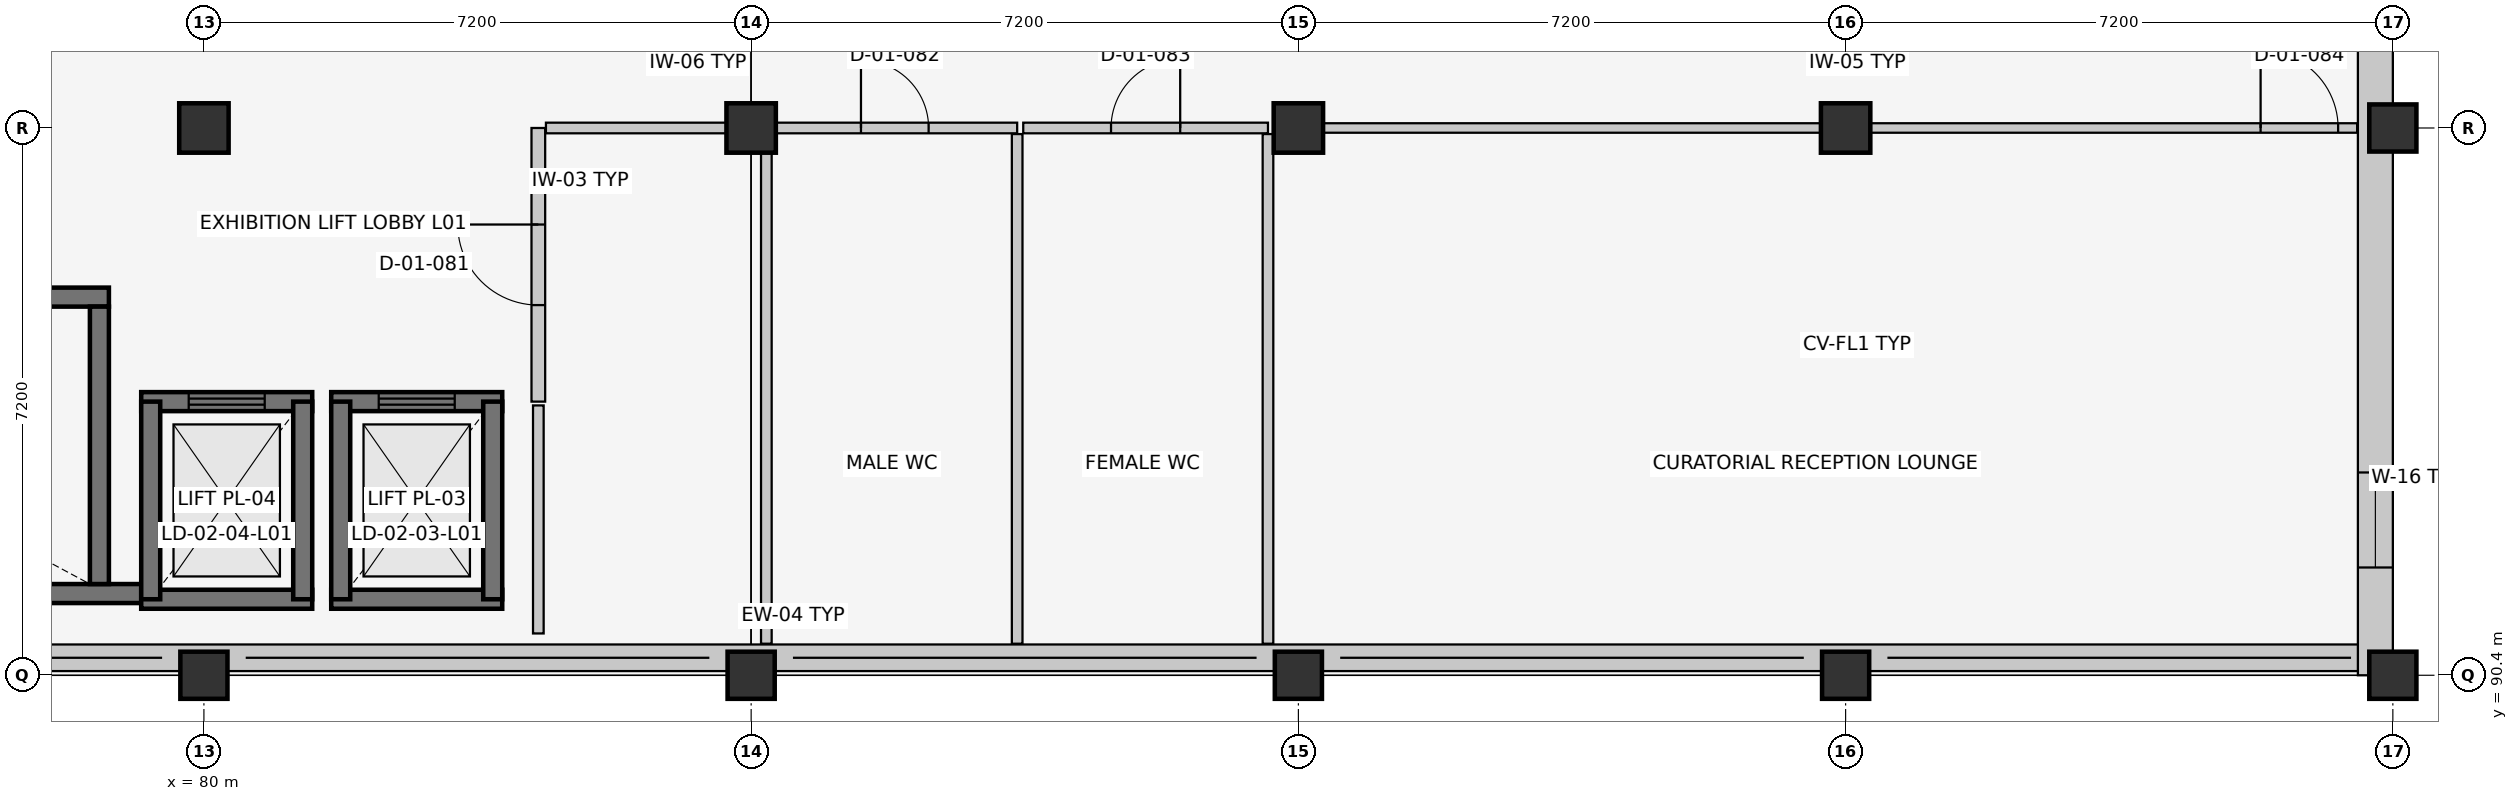
"""IFC4 building model, lengths in metres.
Left out: names, types, materials, properties, quantities, classifications, styles, units other than length and angle.
Written with IfcOpenShell. Run it as: python <this file> out.ifc"""

import sys

from ifc_helpers import new_model, si_unit, direction, frame, frame_2d, origin, origin_2d, place, context, subcontext, project, spatial, rectangle, extrude, element, fill, save


model = new_model("IFC4")
c1 = context("Model", 3, precision=1e-05, world=origin(), true_north=direction((0.0, 1.0)))
c2 = subcontext(c1, "Body", "Model", "MODEL_VIEW")
j1 = project(units=[si_unit("LENGTHUNIT", "METRE"), si_unit("PLANEANGLEUNIT", "RADIAN")], contexts=[c1])
p1 = place(None, origin())
s1 = spatial("IfcSite", under=j1, at=p1, CompositionType="ELEMENT")
p2 = place(p1, origin())
s2 = spatial("IfcBuilding", under=s1, at=p2, CompositionType="ELEMENT")
p3 = place(p2, frame((0.0, 0.0, 5.4)))
s3 = spatial("IfcBuildingStorey", under=s2, at=p3, CompositionType="ELEMENT", Elevation=5.4)
p4 = place(p3, frame((80.0, 90.4, 0.0), z_axis=(0.0, 0.0, 1.0), x_axis=(1.0, 0.0, 0.0)))
e1 = element("IfcColumn", 1, at=p4, inside=s3, PredefinedType="COLUMN", context=c2, shape_type="SweptSolid", body=[
    extrude(rectangle(XDim=0.62, YDim=0.62, at=origin_2d()), origin(), (0.0, 0.0, 1.0), 4.2),
])
p5 = place(p3, frame((80.0, 97.6, 0.0), z_axis=(0.0, 0.0, 1.0), x_axis=(1.0, 0.0, 0.0)))
e2 = element("IfcColumn", 2, at=p5, inside=s3, PredefinedType="COLUMN", context=c2, shape_type="SweptSolid", body=[
    extrude(rectangle(XDim=0.65, YDim=0.65, at=origin_2d()), origin(), (0.0, 0.0, 1.0), 4.2),
])
p6 = place(p3, frame((87.2, 90.4, 0.0), z_axis=(0.0, 0.0, 1.0), x_axis=(1.0, 0.0, 0.0)))
e3 = element("IfcColumn", 3, at=p6, inside=s3, PredefinedType="COLUMN", context=c2, shape_type="SweptSolid", body=[
    extrude(rectangle(XDim=0.62, YDim=0.62, at=origin_2d()), origin(), (0.0, 0.0, 1.0), 4.2),
])
p7 = place(p3, frame((87.2, 97.6, 0.0), z_axis=(0.0, 0.0, 1.0), x_axis=(1.0, 0.0, 0.0)))
e4 = element("IfcColumn", 4, at=p7, inside=s3, PredefinedType="COLUMN", context=c2, shape_type="SweptSolid", body=[
    extrude(rectangle(XDim=0.65, YDim=0.65, at=origin_2d()), origin(), (0.0, 0.0, 1.0), 4.2),
])
p8 = place(p3, frame((94.4, 90.4, 0.0), z_axis=(0.0, 0.0, 1.0), x_axis=(1.0, 0.0, 0.0)))
e5 = element("IfcColumn", 5, at=p8, inside=s3, PredefinedType="COLUMN", context=c2, shape_type="SweptSolid", body=[
    extrude(rectangle(XDim=0.62, YDim=0.62, at=origin_2d()), origin(), (0.0, 0.0, 1.0), 4.2),
])
p9 = place(p3, frame((94.4, 97.6, 0.0), z_axis=(0.0, 0.0, 1.0), x_axis=(1.0, 0.0, 0.0)))
e6 = element("IfcColumn", 6, at=p9, inside=s3, PredefinedType="COLUMN", context=c2, shape_type="SweptSolid", body=[
    extrude(rectangle(XDim=0.65, YDim=0.65, at=origin_2d()), origin(), (0.0, 0.0, 1.0), 4.2),
])
p10 = place(p3, frame((101.6, 90.4, 0.0), z_axis=(0.0, 0.0, 1.0), x_axis=(1.0, 0.0, 0.0)))
e7 = element("IfcColumn", 7, at=p10, inside=s3, PredefinedType="COLUMN", context=c2, shape_type="SweptSolid", body=[
    extrude(rectangle(XDim=0.62, YDim=0.62, at=origin_2d()), origin(), (0.0, 0.0, 1.0), 4.2),
])
p11 = place(p3, frame((101.6, 97.6, 0.0), z_axis=(0.0, 0.0, 1.0), x_axis=(1.0, 0.0, 0.0)))
e8 = element("IfcColumn", 8, at=p11, inside=s3, PredefinedType="COLUMN", context=c2, shape_type="SweptSolid", body=[
    extrude(rectangle(XDim=0.65, YDim=0.65, at=origin_2d()), origin(), (0.0, 0.0, 1.0), 4.2),
])
for number, where, z_axis, x_axis in (
    (9, (108.8, 90.4, 0.0), (0.0, 0.0, 1.0), (1.0, 0.0, 0.0)),
    (10, (108.8, 97.6, 0.0), (0.0, 0.0, 1.0), (1.0, 0.0, 0.0)),
):
    element("IfcColumn", number, at=place(p3, frame(where, z_axis=z_axis, x_axis=x_axis)), inside=s3, PredefinedType="COLUMN", context=c2, shape_type="SweptSolid", body=[
        extrude(rectangle(XDim=0.62, YDim=0.62, at=origin_2d()), origin(), (0.0, 0.0, 1.0), 4.2),
    ])
p12 = place(p3, frame((108.8, 90.63, 0.0), z_axis=(0.0, 0.0, 1.0), x_axis=(-1.0, 0.0, 0.0)))
e11 = element("IfcWall", 11, at=p12, inside=s3, PredefinedType="SOLIDWALL", context=c2, shape_type="SweptSolid", body=[
    extrude(rectangle(XDim=43.2, YDim=0.35, at=frame_2d((21.6, 0.0))), origin(), (0.0, 0.0, 1.0), 0.85),
])
p13 = place(p3, frame((108.57, 119.0, 0.0), z_axis=(0.0, 0.0, 1.0), x_axis=(0.0, -1.0, 0.0)))
e12 = element("IfcWall", 12, at=p13, inside=s3, PredefinedType="SOLIDWALL", context=c2, shape_type="SweptSolid", body=[
    extrude(rectangle(XDim=28.6, YDim=0.46, at=frame_2d((14.3, 0.0))), origin(), (0.0, 0.0, 1.0), 3.175),
])
p14 = place(p13, frame((1.418, 0.0, 0.9)))
e13 = element("IfcOpeningElement", 13, at=p14, cuts=e12, PredefinedType="OPENING", context=c2, shape_type="SweptSolid", body=[
    extrude(rectangle(XDim=1.25, YDim=1.45, at=frame_2d((0.625, 0.725))), frame((0.0, 0.242, 0.0), z_axis=(0.0, -1.0, 0.0), x_axis=(1.0, 0.0, 0.0)), (0.0, 0.0, 1.0), 0.484),
])
p15 = place(p13, frame((9.489, 0.0, 0.9)))
e14 = element("IfcOpeningElement", 14, at=p15, cuts=e12, PredefinedType="OPENING", context=c2, shape_type="SweptSolid", body=[
    extrude(rectangle(XDim=1.45, YDim=1.45, at=frame_2d((0.725, 0.725))), frame((0.0, 0.242, 0.0), z_axis=(0.0, -1.0, 0.0), x_axis=(1.0, 0.0, 0.0)), (0.0, 0.0, 1.0), 0.484),
])
p16 = place(p13, frame((25.932, 0.0, 0.9)))
e15 = element("IfcOpeningElement", 15, at=p16, cuts=e12, PredefinedType="OPENING", context=c2, shape_type="SweptSolid", body=[
    extrude(rectangle(XDim=1.25, YDim=1.6, at=frame_2d((0.625, 0.8))), frame((0.0, 0.242, 0.0), z_axis=(0.0, -1.0, 0.0), x_axis=(1.0, 0.0, 0.0)), (0.0, 0.0, 1.0), 0.484),
])
p17 = place(p3, frame((69.75, 91.475, 0.0), z_axis=(0.0, 0.0, 1.0), x_axis=(1.0, 0.0, 0.0)))
e16 = element("IfcWall", 16, at=p17, inside=s3, PredefinedType="SHEAR", context=c2, shape_type="SweptSolid", body=[
    extrude(rectangle(XDim=9.57, YDim=0.25, at=frame_2d((4.785, 0.0))), origin(), (0.0, 0.0, 1.0), 3.92),
])
p18 = place(p3, frame((78.75, 95.375, 0.0), z_axis=(0.0, 0.0, 1.0), x_axis=(-1.0, 0.0, 0.0)))
e17 = element("IfcWall", 17, at=p18, inside=s3, PredefinedType="SHEAR", context=c2, shape_type="SweptSolid", body=[
    extrude(rectangle(XDim=9.0, YDim=0.25, at=frame_2d((4.5, 0.0))), origin(), (0.0, 0.0, 1.0), 3.92),
])
p19 = place(p3, frame((78.625, 91.6, 0.0), z_axis=(0.0, 0.0, 1.0), x_axis=(0.0, 1.0, 0.0)))
e18 = element("IfcWall", 18, at=p19, inside=s3, PredefinedType="SHEAR", context=c2, shape_type="SweptSolid", body=[
    extrude(rectangle(XDim=3.65, YDim=0.25, at=frame_2d((1.825, 0.0))), origin(), (0.0, 0.0, 1.0), 3.92),
])
p20 = place(p3, frame((79.175, 91.4, 0.0), z_axis=(0.0, 0.0, 1.0), x_axis=(1.0, 0.0, 0.0)))
e19 = element("IfcWall", 19, at=p20, inside=s3, PredefinedType="SHEAR", context=c2, shape_type="SweptSolid", body=[
    extrude(rectangle(XDim=2.25, YDim=0.25, at=frame_2d((1.125, 0.0))), origin(), (0.0, 0.0, 1.0), 3.92),
])
p21 = place(p3, frame((81.425, 94.0, 0.0), z_axis=(0.0, 0.0, 1.0), x_axis=(-1.0, 0.0, 0.0)))
e20 = element("IfcWall", 20, at=p21, inside=s3, PredefinedType="SHEAR", context=c2, shape_type="SweptSolid", body=[
    extrude(rectangle(XDim=2.25, YDim=0.25, at=frame_2d((1.125, 0.0))), origin(), (0.0, 0.0, 1.0), 3.92),
])
p22 = place(p21, frame((0.625, 0.0, 0.0)))
e21 = element("IfcOpeningElement", 21, at=p22, cuts=e20, PredefinedType="OPENING", context=c2, shape_type="SweptSolid", body=[
    extrude(rectangle(XDim=1.0, YDim=2.15, at=frame_2d((0.5, 1.075))), frame((0.0, 0.137, 0.0), z_axis=(0.0, -1.0, 0.0), x_axis=(1.0, 0.0, 0.0)), (0.0, 0.0, 1.0), 0.274),
])
for number, where, z_axis, x_axis in (
    (22, (79.3, 94.0, 0.0), (0.0, 0.0, 1.0), (0.0, -1.0, 0.0)),
    (23, (81.3, 91.4, 0.0), (0.0, 0.0, 1.0), (0.0, 1.0, 0.0)),
):
    element("IfcWall", number, at=place(p3, frame(where, z_axis=z_axis, x_axis=x_axis)), inside=s3, PredefinedType="SHEAR", context=c2, shape_type="SweptSolid", body=[
        extrude(rectangle(XDim=2.6, YDim=0.25, at=frame_2d((1.3, 0.0))), origin(), (0.0, 0.0, 1.0), 3.92),
    ])
p23 = place(p3, frame((81.675, 91.4, 0.0), z_axis=(0.0, 0.0, 1.0), x_axis=(1.0, 0.0, 0.0)))
e24 = element("IfcWall", 24, at=p23, inside=s3, PredefinedType="SHEAR", context=c2, shape_type="SweptSolid", body=[
    extrude(rectangle(XDim=2.25, YDim=0.25, at=frame_2d((1.125, 0.0))), origin(), (0.0, 0.0, 1.0), 3.92),
])
p24 = place(p3, frame((83.925, 94.0, 0.0), z_axis=(0.0, 0.0, 1.0), x_axis=(-1.0, 0.0, 0.0)))
e25 = element("IfcWall", 25, at=p24, inside=s3, PredefinedType="SHEAR", context=c2, shape_type="SweptSolid", body=[
    extrude(rectangle(XDim=2.25, YDim=0.25, at=frame_2d((1.125, 0.0))), origin(), (0.0, 0.0, 1.0), 3.92),
])
p25 = place(p24, frame((0.625, 0.0, 0.0)))
e26 = element("IfcOpeningElement", 26, at=p25, cuts=e25, PredefinedType="OPENING", context=c2, shape_type="SweptSolid", body=[
    extrude(rectangle(XDim=1.0, YDim=2.15, at=frame_2d((0.5, 1.075))), frame((0.0, 0.137, 0.0), z_axis=(0.0, -1.0, 0.0), x_axis=(1.0, 0.0, 0.0)), (0.0, 0.0, 1.0), 0.274),
])
for number, where, z_axis, x_axis in (
    (27, (81.8, 94.0, 0.0), (0.0, 0.0, 1.0), (0.0, -1.0, 0.0)),
    (28, (83.8, 91.4, 0.0), (0.0, 0.0, 1.0), (0.0, 1.0, 0.0)),
):
    element("IfcWall", number, at=place(p3, frame(where, z_axis=z_axis, x_axis=x_axis)), inside=s3, PredefinedType="SHEAR", context=c2, shape_type="SweptSolid", body=[
        extrude(rectangle(XDim=2.6, YDim=0.25, at=frame_2d((1.3, 0.0))), origin(), (0.0, 0.0, 1.0), 3.92),
    ])
p26 = place(p3, frame((84.4, 94.0, 0.0), z_axis=(0.0, 0.0, 1.0), x_axis=(0.0, 1.0, 0.0)))
e29 = element("IfcWall", 29, at=p26, inside=s3, PredefinedType="PARTITIONING", context=c2, shape_type="SweptSolid", body=[
    extrude(rectangle(XDim=3.6, YDim=0.18, at=frame_2d((1.8, 0.0))), origin(), (0.0, 0.0, 1.0), 3.92),
])
p27 = place(p26, frame((1.27, 0.0, 0.0)))
e30 = element("IfcOpeningElement", 30, at=p27, cuts=e29, PredefinedType="OPENING", context=c2, shape_type="SweptSolid", body=[
    extrude(rectangle(XDim=1.06, YDim=2.1, at=frame_2d((0.53, 1.05))), frame((0.0, 0.102, 0.0), z_axis=(0.0, -1.0, 0.0), x_axis=(1.0, 0.0, 0.0)), (0.0, 0.0, 1.0), 0.204),
])
p28 = place(p3, frame((84.5, 97.6, 0.0), z_axis=(0.0, 0.0, 1.0), x_axis=(1.0, 0.0, 0.0)))
e31 = element("IfcWall", 31, at=p28, inside=s3, PredefinedType="PARTITIONING", context=c2, shape_type="SweptSolid", body=[
    extrude(rectangle(XDim=2.9, YDim=0.14, at=frame_2d((1.45, 0.0))), origin(), (0.0, 0.0, 1.0), 3.145),
])
p29 = place(p3, frame((87.4, 90.815, 0.0), z_axis=(0.0, 0.0, 1.0), x_axis=(0.0, 1.0, 0.0)))
e32 = element("IfcWall", 32, at=p29, inside=s3, PredefinedType="PARTITIONING", context=c2, shape_type="SweptSolid", body=[
    extrude(rectangle(XDim=6.705, YDim=0.14, at=frame_2d((3.353, 0.0))), origin(), (0.0, 0.0, 1.0), 3.295),
])
p30 = place(p3, frame((87.48, 97.6, 0.0), z_axis=(0.0, 0.0, 1.0), x_axis=(1.0, 0.0, 0.0)))
e33 = element("IfcWall", 33, at=p30, inside=s3, PredefinedType="PARTITIONING", context=c2, shape_type="SweptSolid", body=[
    extrude(rectangle(XDim=3.22, YDim=0.14, at=frame_2d((1.61, 0.0))), origin(), (0.0, 0.0, 1.0), 3.095),
])
p31 = place(p30, frame((1.165, 0.0, 0.0)))
e34 = element("IfcOpeningElement", 34, at=p31, cuts=e33, PredefinedType="OPENING", context=c2, shape_type="SweptSolid", body=[
    extrude(rectangle(XDim=0.89, YDim=2.05, at=frame_2d((0.445, 1.025))), frame((0.0, 0.082, 0.0), z_axis=(0.0, -1.0, 0.0), x_axis=(1.0, 0.0, 0.0)), (0.0, 0.0, 1.0), 0.164),
])
p32 = place(p3, frame((90.7, 90.815, 0.0), z_axis=(0.0, 0.0, 1.0), x_axis=(0.0, 1.0, 0.0)))
e35 = element("IfcWall", 35, at=p32, inside=s3, PredefinedType="PARTITIONING", context=c2, shape_type="SweptSolid", body=[
    extrude(rectangle(XDim=6.705, YDim=0.14, at=frame_2d((3.353, 0.0))), origin(), (0.0, 0.0, 1.0), 3.685),
])
p33 = place(p3, frame((90.78, 97.6, 0.0), z_axis=(0.0, 0.0, 1.0), x_axis=(1.0, 0.0, 0.0)))
e36 = element("IfcWall", 36, at=p33, inside=s3, PredefinedType="PARTITIONING", context=c2, shape_type="SweptSolid", body=[
    extrude(rectangle(XDim=3.22, YDim=0.14, at=frame_2d((1.61, 0.0))), origin(), (0.0, 0.0, 1.0), 3.095),
])
p34 = place(p33, frame((1.155, 0.0, 0.0)))
e37 = element("IfcOpeningElement", 37, at=p34, cuts=e36, PredefinedType="OPENING", context=c2, shape_type="SweptSolid", body=[
    extrude(rectangle(XDim=0.91, YDim=2.06, at=frame_2d((0.455, 1.03))), frame((0.0, 0.082, 0.0), z_axis=(0.0, -1.0, 0.0), x_axis=(1.0, 0.0, 0.0)), (0.0, 0.0, 1.0), 0.164),
])
p35 = place(p3, frame((94.0, 90.815, 0.0), z_axis=(0.0, 0.0, 1.0), x_axis=(0.0, 1.0, 0.0)))
e38 = element("IfcWall", 38, at=p35, inside=s3, PredefinedType="PARTITIONING", context=c2, shape_type="SweptSolid", body=[
    extrude(rectangle(XDim=6.705, YDim=0.14, at=frame_2d((3.353, 0.0))), origin(), (0.0, 0.0, 1.0), 3.92),
])
p36 = place(p3, frame((94.08, 97.6, 0.0), z_axis=(0.0, 0.0, 1.0), x_axis=(1.0, 0.0, 0.0)))
e39 = element("IfcWall", 39, at=p36, inside=s3, PredefinedType="PARTITIONING", context=c2, shape_type="SweptSolid", body=[
    extrude(rectangle(XDim=14.25, YDim=0.125, at=frame_2d((7.125, 0.0))), origin(), (0.0, 0.0, 1.0), 3.045),
])
p37 = place(p36, frame((12.98, 0.0, 0.0)))
e40 = element("IfcOpeningElement", 40, at=p37, cuts=e39, PredefinedType="OPENING", context=c2, shape_type="SweptSolid", body=[
    extrude(rectangle(XDim=1.02, YDim=2.12, at=frame_2d((0.51, 1.06))), frame((0.0, 0.074, 0.0), z_axis=(0.0, -1.0, 0.0), x_axis=(1.0, 0.0, 0.0)), (0.0, 0.0, 1.0), 0.149),
])
p38 = place(p3, frame((84.4, 90.95, 0.0), z_axis=(0.0, 0.0, 1.0), x_axis=(0.0, 1.0, 0.0)))
e41 = element("IfcWall", 41, at=p38, inside=s3, PredefinedType="PARTITIONING", context=c2, shape_type="SweptSolid", body=[
    extrude(rectangle(XDim=3.0, YDim=0.14, at=frame_2d((1.5, 0.0))), origin(), (0.0, 0.0, 1.0), 3.92),
])
p39 = place(p16, origin())
e42 = element("IfcWindow", 42, at=p39, inside=s3, PartitioningType="SINGLE_PANEL", PredefinedType="WINDOW", context=c2, shape_type="SweptSolid", body=[
    extrude(rectangle(XDim=1.25, YDim=1.6, at=frame_2d((0.625, 0.8))), frame((0.0, 0.03, 0.0), z_axis=(0.0, -1.0, 0.0), x_axis=(1.0, 0.0, 0.0)), (0.0, 0.0, 1.0), 0.06),
])
fill(e15, e42)
p40 = place(p22, origin())
e43 = element("IfcDoor", 43, at=p40, inside=s3, OperationType="SLIDING_TO_LEFT", PredefinedType="DOOR", context=c2, shape_type="SweptSolid", body=[
    extrude(rectangle(XDim=1.0, YDim=2.15, at=frame_2d((0.5, 1.075))), frame((0.0, 0.025, 0.0), z_axis=(0.0, -1.0, 0.0), x_axis=(1.0, 0.0, 0.0)), (0.0, 0.0, 1.0), 0.05),
])
fill(e21, e43)
p41 = place(p25, origin())
e44 = element("IfcDoor", 44, at=p41, inside=s3, OperationType="SLIDING_TO_LEFT", PredefinedType="DOOR", context=c2, shape_type="SweptSolid", body=[
    extrude(rectangle(XDim=1.0, YDim=2.15, at=frame_2d((0.5, 1.075))), frame((0.0, 0.025, 0.0), z_axis=(0.0, -1.0, 0.0), x_axis=(1.0, 0.0, 0.0)), (0.0, 0.0, 1.0), 0.05),
])
fill(e26, e44)
p42 = place(p27, origin())
e45 = element("IfcDoor", 45, at=p42, inside=s3, OperationType="SINGLE_SWING_RIGHT", PredefinedType="DOOR", context=c2, shape_type="SweptSolid", body=[
    extrude(rectangle(XDim=1.06, YDim=2.1, at=frame_2d((0.53, 1.05))), frame((0.0, 0.025, 0.0), z_axis=(0.0, -1.0, 0.0), x_axis=(1.0, 0.0, 0.0)), (0.0, 0.0, 1.0), 0.05),
])
fill(e30, e45)
p43 = place(p31, origin())
e46 = element("IfcDoor", 46, at=p43, inside=s3, OperationType="SINGLE_SWING_LEFT", PredefinedType="DOOR", context=c2, shape_type="SweptSolid", body=[
    extrude(rectangle(XDim=0.89, YDim=2.05, at=frame_2d((0.445, 1.025))), frame((0.0, 0.025, 0.0), z_axis=(0.0, -1.0, 0.0), x_axis=(1.0, 0.0, 0.0)), (0.0, 0.0, 1.0), 0.05),
])
fill(e34, e46)
p44 = place(p34, origin())
e47 = element("IfcDoor", 47, at=p44, inside=s3, OperationType="SINGLE_SWING_RIGHT", PredefinedType="DOOR", context=c2, shape_type="SweptSolid", body=[
    extrude(rectangle(XDim=0.91, YDim=2.06, at=frame_2d((0.455, 1.03))), frame((0.0, 0.025, 0.0), z_axis=(0.0, -1.0, 0.0), x_axis=(1.0, 0.0, 0.0)), (0.0, 0.0, 1.0), 0.05),
])
fill(e37, e47)
p45 = place(p37, origin())
e48 = element("IfcDoor", 48, at=p45, inside=s3, OperationType="SINGLE_SWING_LEFT", PredefinedType="DOOR", context=c2, shape_type="SweptSolid", body=[
    extrude(rectangle(XDim=1.02, YDim=2.12, at=frame_2d((0.51, 1.06))), frame((0.0, 0.025, 0.0), z_axis=(0.0, -1.0, 0.0), x_axis=(1.0, 0.0, 0.0)), (0.0, 0.0, 1.0), 0.05),
])
fill(e40, e48)
save(model, sys.argv[1])
